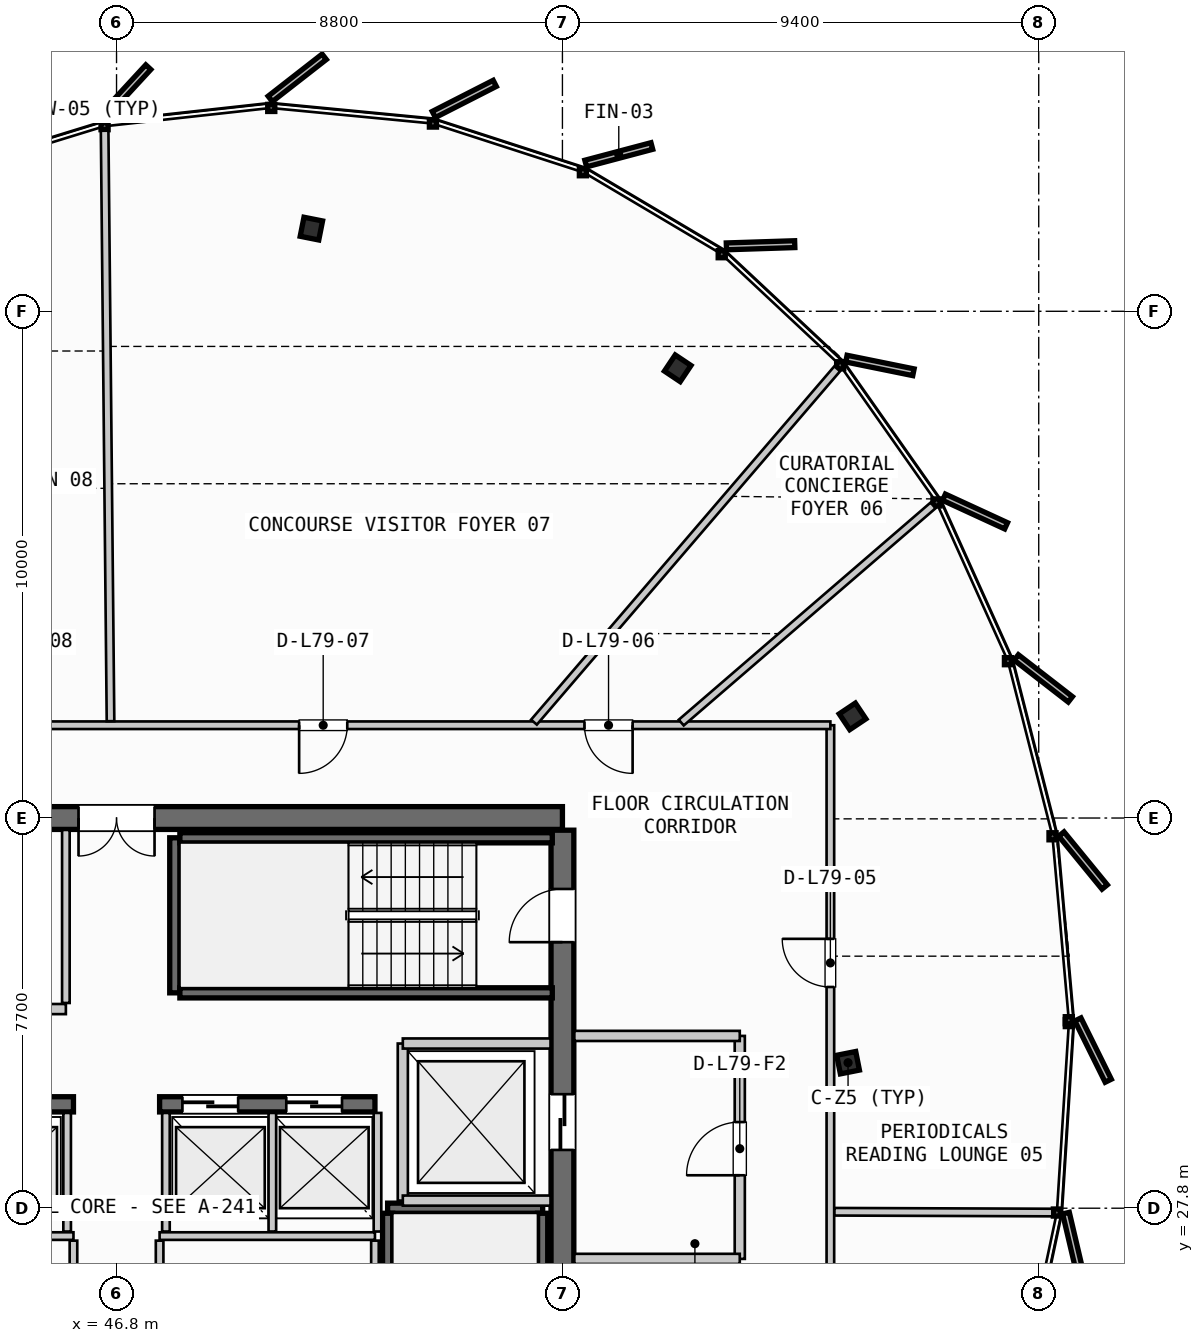
"""IFC4 building model, lengths in metres.
Left out: names, types, materials, properties, quantities, classifications, styles, units other than length and angle.
Written with IfcOpenShell. Run it as: python <this file> out.ifc"""

import sys

from ifc_helpers import new_model, si_unit, direction, frame, frame_2d, origin, origin_2d, place, context, subcontext, project, spatial, rectangle, i_section, extrude, source, transform, mapped, element, fill, save


model = new_model("IFC4")
c1 = context("Model", 3, precision=1e-05, world=origin(), true_north=direction((0.0, 1.0)))
c2 = subcontext(c1, "Body", "Model", "MODEL_VIEW")
j1 = project(units=[si_unit("LENGTHUNIT", "METRE"), si_unit("PLANEANGLEUNIT", "RADIAN")], contexts=[c1])
p1 = place(None, origin())
s1 = spatial("IfcSite", under=j1, at=p1, CompositionType="ELEMENT")
p2 = place(p1, origin())
s2 = spatial("IfcBuilding", under=s1, at=p2, CompositionType="ELEMENT")
p3 = place(p2, frame((0.0, 0.0, 297.4)))
s3 = spatial("IfcBuildingStorey", under=s2, at=p3, CompositionType="ELEMENT", Elevation=297.4)
p4 = place(p3, frame((55.6, 35.5, 0.0), z_axis=(0.0, 0.0, 1.0), x_axis=(-1.0, 0.0, 0.0)))
e1 = element("IfcWall", 1, at=p4, inside=s3, PredefinedType="SHEAR", context=c2, shape_type="SweptSolid", body=[
    extrude(rectangle(XDim=17.6, YDim=0.45, at=frame_2d((8.8, 0.0))), origin(), (0.0, 0.0, 1.0), 3.21),
])
p5 = place(p4, frame((8.05, 0.0, 0.0)))
e2 = element("IfcOpeningElement", 2, at=p5, cuts=e1, PredefinedType="OPENING", context=c2, shape_type="SweptSolid", body=[
    extrude(rectangle(XDim=1.5, YDim=2.2, at=frame_2d((0.75, 1.1))), frame((0.0, 0.235, 0.0), z_axis=(0.0, -1.0, 0.0), x_axis=(1.0, 0.0, 0.0)), (0.0, 0.0, 1.0), 0.47),
])
p6 = place(p4, frame((15.85, 0.0, 0.0)))
e3 = element("IfcOpeningElement", 3, at=p6, cuts=e1, PredefinedType="OPENING", context=c2, shape_type="SweptSolid", body=[
    extrude(rectangle(XDim=0.85, YDim=2.15, at=frame_2d((0.425, 1.075))), frame((0.0, 0.235, 0.0), z_axis=(0.0, -1.0, 0.0), x_axis=(1.0, 0.0, 0.0)), (0.0, 0.0, 1.0), 0.47),
])
p7 = place(p4, frame((14.35, 0.0, 0.0)))
e4 = element("IfcOpeningElement", 4, at=p7, cuts=e1, PredefinedType="OPENING", context=c2, shape_type="SweptSolid", body=[
    extrude(rectangle(XDim=0.85, YDim=2.15, at=frame_2d((0.425, 1.075))), frame((0.0, 0.235, 0.0), z_axis=(0.0, -1.0, 0.0), x_axis=(1.0, 0.0, 0.0)), (0.0, 0.0, 1.0), 0.47),
])
p8 = place(p4, frame((12.3, 0.0, 0.0)))
e5 = element("IfcOpeningElement", 5, at=p8, cuts=e1, PredefinedType="OPENING", context=c2, shape_type="SweptSolid", body=[
    extrude(rectangle(XDim=0.95, YDim=2.15, at=frame_2d((0.475, 1.075))), frame((0.0, 0.235, 0.0), z_axis=(0.0, -1.0, 0.0), x_axis=(1.0, 0.0, 0.0)), (0.0, 0.0, 1.0), 0.47),
])
p9 = place(p4, frame((10.2, 0.0, 0.0)))
e6 = element("IfcOpeningElement", 6, at=p9, cuts=e1, PredefinedType="OPENING", context=c2, shape_type="SweptSolid", body=[
    extrude(rectangle(XDim=0.9, YDim=2.15, at=frame_2d((0.45, 1.075))), frame((0.0, 0.235, 0.0), z_axis=(0.0, -1.0, 0.0), x_axis=(1.0, 0.0, 0.0)), (0.0, 0.0, 1.0), 0.47),
])
p10 = place(p3, frame((55.6, 20.34, 0.0), z_axis=(0.0, 0.0, 1.0), x_axis=(0.0, 1.0, 0.0)))
e7 = element("IfcWall", 7, at=p10, inside=s3, PredefinedType="SHEAR", context=c2, shape_type="SweptSolid", body=[
    extrude(rectangle(XDim=14.92, YDim=0.45, at=frame_2d((7.46, 0.0))), origin(), (0.0, 0.0, 1.0), 3.21),
])
p11 = place(p10, frame((12.71, 0.0, 0.0)))
e8 = element("IfcOpeningElement", 8, at=p11, cuts=e7, PredefinedType="OPENING", context=c2, shape_type="SweptSolid", body=[
    extrude(rectangle(XDim=1.05, YDim=2.15, at=frame_2d((0.525, 1.075))), frame((0.0, 0.235, 0.0), z_axis=(0.0, -1.0, 0.0), x_axis=(1.0, 0.0, 0.0)), (0.0, 0.0, 1.0), 0.47),
])
p12 = place(p10, frame((8.61, 0.0, 0.0)))
e9 = element("IfcOpeningElement", 9, at=p12, cuts=e7, PredefinedType="OPENING", context=c2, shape_type="SweptSolid", body=[
    extrude(rectangle(XDim=1.1, YDim=2.2, at=frame_2d((0.55, 1.1))), frame((0.0, 0.235, 0.0), z_axis=(0.0, -1.0, 0.0), x_axis=(1.0, 0.0, 0.0)), (0.0, 0.0, 1.0), 0.47),
])
p13 = place(p3, frame((41.7, 29.85, 0.0), z_axis=(0.0, 0.0, 1.0), x_axis=(1.0, 0.0, 0.0)))
e10 = element("IfcWall", 10, at=p13, inside=s3, PredefinedType="SHEAR", context=c2, shape_type="SweptSolid", body=[
    extrude(rectangle(XDim=4.25, YDim=0.3, at=frame_2d((2.125, 0.0))), origin(), (0.0, 0.0, 1.0), 3.21),
])
p14 = place(p13, frame((0.45, 0.0, 0.0)))
e11 = element("IfcOpeningElement", 11, at=p14, cuts=e10, PredefinedType="OPENING", context=c2, shape_type="SweptSolid", body=[
    extrude(rectangle(XDim=1.1, YDim=2.2, at=frame_2d((0.55, 1.1))), frame((0.0, 0.16, 0.0), z_axis=(0.0, -1.0, 0.0), x_axis=(1.0, 0.0, 0.0)), (0.0, 0.0, 1.0), 0.32),
])
p15 = place(p13, frame((2.5, 0.0, 0.0)))
e12 = element("IfcOpeningElement", 12, at=p15, cuts=e10, PredefinedType="OPENING", context=c2, shape_type="SweptSolid", body=[
    extrude(rectangle(XDim=1.1, YDim=2.2, at=frame_2d((0.55, 1.1))), frame((0.0, 0.16, 0.0), z_axis=(0.0, -1.0, 0.0), x_axis=(1.0, 0.0, 0.0)), (0.0, 0.0, 1.0), 0.32),
])
p16 = place(p3, frame((47.65, 29.85, 0.0), z_axis=(0.0, 0.0, 1.0), x_axis=(1.0, 0.0, 0.0)))
e13 = element("IfcWall", 13, at=p16, inside=s3, PredefinedType="SHEAR", context=c2, shape_type="SweptSolid", body=[
    extrude(rectangle(XDim=4.25, YDim=0.3, at=frame_2d((2.125, 0.0))), origin(), (0.0, 0.0, 1.0), 3.21),
])
p17 = place(p16, frame((0.45, 0.0, 0.0)))
e14 = element("IfcOpeningElement", 14, at=p17, cuts=e13, PredefinedType="OPENING", context=c2, shape_type="SweptSolid", body=[
    extrude(rectangle(XDim=1.1, YDim=2.2, at=frame_2d((0.55, 1.1))), frame((0.0, 0.16, 0.0), z_axis=(0.0, -1.0, 0.0), x_axis=(1.0, 0.0, 0.0)), (0.0, 0.0, 1.0), 0.32),
])
p18 = place(p16, frame((2.5, 0.0, 0.0)))
e15 = element("IfcOpeningElement", 15, at=p18, cuts=e13, PredefinedType="OPENING", context=c2, shape_type="SweptSolid", body=[
    extrude(rectangle(XDim=1.1, YDim=2.2, at=frame_2d((0.55, 1.1))), frame((0.0, 0.16, 0.0), z_axis=(0.0, -1.0, 0.0), x_axis=(1.0, 0.0, 0.0)), (0.0, 0.0, 1.0), 0.32),
])
m1 = source(origin(), c2, "Body", "SweptSolid", [
    extrude(i_section(OverallWidth=0.374, OverallDepth=0.383, WebThickness=0.017, FlangeThickness=0.026, FilletRadius=0.015, at=origin_2d()), origin(), (0.0, 0.0, 1.0), 3.21),
])
for number, where, z_axis, x_axis in (
    (16, (61.237, 30.672, 0.0), (0.0, 0.0, 1.0), (0.981, 0.195, 0.0)),
    (17, (61.326, 37.506, 0.0), (0.0, 0.0, 1.0), (0.831, 0.556, 0.0)),
    (18, (57.875, 44.375, 0.0), (0.0, 0.0, 1.0), (0.556, 0.831, 0.0)),
    (19, (50.645, 47.132, 0.0), (0.0, 0.0, 1.0), (0.195, 0.981, 0.0)),
):
    element("IfcColumn", number, at=place(p3, frame(where, z_axis=z_axis, x_axis=x_axis)), inside=s3, PredefinedType="COLUMN", context=c2, shape_type="MappedRepresentation", body=[
        mapped(m1, transform((0.0, 0.0, 0.0), scale=1.0)),
    ])
p19 = place(p3, frame((52.15, 27.8, 0.0), z_axis=(0.0, 0.0, 1.0), x_axis=(1.0, 0.0, 0.0)))
e20 = element("IfcWall", 20, at=p19, inside=s3, PredefinedType="SHEAR", context=c2, shape_type="SweptSolid", body=[
    extrude(rectangle(XDim=3.06, YDim=0.2, at=frame_2d((1.53, 0.0))), origin(), (0.0, 0.0, 1.0), 3.21),
])
for number, where, z_axis, x_axis in (
    (21, (55.21, 27.7, 0.0), (0.0, 0.0, 1.0), (0.0, -1.0, 0.0)),
    (22, (52.15, 20.35, 0.0), (0.0, 0.0, 1.0), (0.0, 1.0, 0.0)),
):
    element("IfcWall", number, at=place(p3, frame(where, z_axis=z_axis, x_axis=x_axis)), inside=s3, PredefinedType="SHEAR", context=c2, shape_type="SweptSolid", body=[
        extrude(rectangle(XDim=7.35, YDim=0.2, at=frame_2d((3.675, 0.0))), origin(), (0.0, 0.0, 1.0), 3.21),
    ])
p20 = place(p3, frame((47.95, 32.05, 0.0), z_axis=(0.0, 0.0, 1.0), x_axis=(0.0, 1.0, 0.0)))
e23 = element("IfcWall", 23, at=p20, inside=s3, PredefinedType="SHEAR", context=c2, shape_type="SweptSolid", body=[
    extrude(rectangle(XDim=3.06, YDim=0.2, at=frame_2d((1.53, 0.0))), origin(), (0.0, 0.0, 1.0), 3.21),
])
for number, where, z_axis, x_axis in (
    (24, (48.05, 35.11, 0.0), (0.0, 0.0, 1.0), (1.0, 0.0, 0.0)),
    (25, (55.4, 32.05, 0.0), (0.0, 0.0, 1.0), (-1.0, 0.0, 0.0)),
):
    element("IfcWall", number, at=place(p3, frame(where, z_axis=z_axis, x_axis=x_axis)), inside=s3, PredefinedType="SHEAR", context=c2, shape_type="SweptSolid", body=[
        extrude(rectangle(XDim=7.35, YDim=0.2, at=frame_2d((3.675, 0.0))), origin(), (0.0, 0.0, 1.0), 3.21),
    ])
p21 = place(p3, frame((52.45, 27.95, 0.0), z_axis=(0.0, 0.0, 1.0), x_axis=(0.0, 1.0, 0.0)))
e26 = element("IfcWall", 26, at=p21, inside=s3, PredefinedType="PARTITIONING", context=c2, shape_type="SweptSolid", body=[
    extrude(rectangle(XDim=3.1, YDim=0.2, at=frame_2d((1.55, 0.0))), origin(), (0.0, 0.0, 1.0), 2.28),
])
for number, where, z_axis, x_axis in (
    (27, (52.45, 27.95, 0.0), (0.0, 0.0, 1.0), (1.0, 0.0, 0.0)),
    (28, (52.45, 31.05, 0.0), (0.0, 0.0, 1.0), (1.0, 0.0, 0.0)),
):
    element("IfcWall", number, at=place(p3, frame(where, z_axis=z_axis, x_axis=x_axis)), inside=s3, PredefinedType="PARTITIONING", context=c2, shape_type="SweptSolid", body=[
        extrude(rectangle(XDim=2.915, YDim=0.2, at=frame_2d((1.458, 0.0))), origin(), (0.0, 0.0, 1.0), 2.28),
    ])
p22 = place(p3, frame((59.1, 26.8, 0.0), z_axis=(0.0, 0.0, 1.0), x_axis=(0.0, 1.0, 0.0)))
e29 = element("IfcWall", 29, at=p22, inside=s3, PredefinedType="PARTITIONING", context=c2, shape_type="SweptSolid", body=[
    extrude(rectangle(XDim=4.4, YDim=0.2, at=frame_2d((2.2, 0.0))), origin(), (0.0, 0.0, 1.0), 2.28),
])
p23 = place(p22, frame((1.65, 0.0, 0.0)))
e30 = element("IfcOpeningElement", 30, at=p23, cuts=e29, PredefinedType="OPENING", context=c2, shape_type="SweptSolid", body=[
    extrude(rectangle(XDim=1.05, YDim=2.15, at=frame_2d((0.525, 1.075))), frame((0.0, 0.11, 0.0), z_axis=(0.0, -1.0, 0.0), x_axis=(1.0, 0.0, 0.0)), (0.0, 0.0, 1.0), 0.22),
])
for number, where, z_axis, x_axis in (
    (31, (55.835, 26.8, 0.0), (0.0, 0.0, 1.0), (1.0, 0.0, 0.0)),
    (32, (55.835, 31.2, 0.0), (0.0, 0.0, 1.0), (1.0, 0.0, 0.0)),
):
    element("IfcWall", number, at=place(p3, frame(where, z_axis=z_axis, x_axis=x_axis)), inside=s3, PredefinedType="PARTITIONING", context=c2, shape_type="SweptSolid", body=[
        extrude(rectangle(XDim=3.265, YDim=0.2, at=frame_2d((1.633, 0.0))), origin(), (0.0, 0.0, 1.0), 2.28),
    ])
for number, where, z_axis, x_axis in (
    (33, (41.7, 27.25, 0.0), (0.0, 0.0, 1.0), (1.0, 0.0, 0.0)),
    (34, (47.65, 27.25, 0.0), (0.0, 0.0, 1.0), (1.0, 0.0, 0.0)),
):
    element("IfcWall", number, at=place(p3, frame(where, z_axis=z_axis, x_axis=x_axis)), inside=s3, PredefinedType="PARTITIONING", context=c2, shape_type="SweptSolid", body=[
        extrude(rectangle(XDim=4.25, YDim=0.15, at=frame_2d((2.125, 0.0))), origin(), (0.0, 0.0, 1.0), 2.28),
    ])
for number, where, z_axis, x_axis in (
    (35, (45.95, 24.92, 0.0), (0.0, 0.0, 1.0), (0.0, 1.0, 0.0)),
    (36, (47.65, 24.92, 0.0), (0.0, 0.0, 1.0), (0.0, 1.0, 0.0)),
    (37, (51.9, 24.92, 0.0), (0.0, 0.0, 1.0), (0.0, 1.0, 0.0)),
):
    element("IfcWall", number, at=place(p3, frame(where, z_axis=z_axis, x_axis=x_axis)), inside=s3, PredefinedType="PARTITIONING", context=c2, shape_type="SweptSolid", body=[
        extrude(rectangle(XDim=2.24, YDim=0.15, at=frame_2d((1.12, 0.0))), origin(), (0.0, 0.0, 1.0), 2.28),
    ])
for number, where, z_axis, x_axis in (
    (38, (45.825, 27.34, 0.0), (0.0, 0.0, 1.0), (0.0, 1.0, 0.0)),
    (39, (47.775, 27.34, 0.0), (0.0, 0.0, 1.0), (0.0, 1.0, 0.0)),
    (40, (49.875, 27.34, 0.0), (0.0, 0.0, 1.0), (0.0, 1.0, 0.0)),
    (41, (51.95, 27.34, 0.0), (0.0, 0.0, 1.0), (0.0, 1.0, 0.0)),
):
    element("IfcWall", number, at=place(p3, frame(where, z_axis=z_axis, x_axis=x_axis)), inside=s3, PredefinedType="PARTITIONING", context=c2, shape_type="SweptSolid", body=[
        extrude(rectangle(XDim=2.34, YDim=0.15, at=frame_2d((1.17, 0.0))), origin(), (0.0, 0.0, 1.0), 2.28),
    ])
p24 = place(p3, frame((38.235, 31.73, 0.0), z_axis=(0.0, 0.0, 1.0), x_axis=(1.0, 0.0, 0.0)))
e42 = element("IfcWall", 42, at=p24, inside=s3, PredefinedType="PARTITIONING", context=c2, shape_type="SweptSolid", body=[
    extrude(rectangle(XDim=7.565, YDim=0.2, at=frame_2d((3.782, 0.0))), origin(), (0.0, 0.0, 1.0), 2.28),
])
p25 = place(p3, frame((45.8, 31.85, 0.0), z_axis=(0.0, 0.0, 1.0), x_axis=(0.0, 1.0, 0.0)))
e43 = element("IfcWall", 43, at=p25, inside=s3, PredefinedType="PARTITIONING", context=c2, shape_type="SweptSolid", body=[
    extrude(rectangle(XDim=3.415, YDim=0.15, at=frame_2d((1.708, 0.0))), origin(), (0.0, 0.0, 1.0), 2.28),
])
p26 = place(p3, frame((60.888, 17.807, 0.0), z_axis=(0.0, 0.0, 1.0), x_axis=(0.0, 1.0, 0.0)))
e44 = element("IfcWall", 44, at=p26, inside=s3, PredefinedType="PARTITIONING", context=c2, shape_type="SweptSolid", body=[
    extrude(rectangle(XDim=19.524, YDim=0.15, at=frame_2d((9.762, 0.0))), origin(), (0.0, 0.0, 1.0), 2.28),
])
p27 = place(p26, frame((5.089, 0.0, 0.0)))
e45 = element("IfcOpeningElement", 45, at=p27, cuts=e44, PredefinedType="OPENING", context=c2, shape_type="SweptSolid", body=[
    extrude(rectangle(XDim=0.95, YDim=2.15, at=frame_2d((0.475, 1.075))), frame((0.0, 0.085, 0.0), z_axis=(0.0, -1.0, 0.0), x_axis=(1.0, 0.0, 0.0)), (0.0, 0.0, 1.0), 0.17),
])
p28 = place(p26, frame((14.359, 0.0, 0.0)))
e46 = element("IfcOpeningElement", 46, at=p28, cuts=e44, PredefinedType="OPENING", context=c2, shape_type="SweptSolid", body=[
    extrude(rectangle(XDim=0.95, YDim=2.15, at=frame_2d((0.475, 1.075))), frame((0.0, 0.085, 0.0), z_axis=(0.0, -1.0, 0.0), x_axis=(1.0, 0.0, 0.0)), (0.0, 0.0, 1.0), 0.17),
])
p29 = place(p3, frame((60.888, 37.331, 0.0), z_axis=(0.0, 0.0, 1.0), x_axis=(-1.0, 0.0, 0.0)))
e47 = element("IfcWall", 47, at=p29, inside=s3, PredefinedType="PARTITIONING", context=c2, shape_type="SweptSolid", body=[
    extrude(rectangle(XDim=28.038, YDim=0.15, at=frame_2d((14.019, 0.0))), origin(), (0.0, 0.0, 1.0), 2.28),
])
p30 = place(p29, frame((3.903, 0.0, 0.0)))
e48 = element("IfcOpeningElement", 48, at=p30, cuts=e47, PredefinedType="OPENING", context=c2, shape_type="SweptSolid", body=[
    extrude(rectangle(XDim=0.95, YDim=2.15, at=frame_2d((0.475, 1.075))), frame((0.0, 0.085, 0.0), z_axis=(0.0, -1.0, 0.0), x_axis=(1.0, 0.0, 0.0)), (0.0, 0.0, 1.0), 0.17),
])
p31 = place(p29, frame((9.534, 0.0, 0.0)))
e49 = element("IfcOpeningElement", 49, at=p31, cuts=e47, PredefinedType="OPENING", context=c2, shape_type="SweptSolid", body=[
    extrude(rectangle(XDim=0.95, YDim=2.15, at=frame_2d((0.475, 1.075))), frame((0.0, 0.085, 0.0), z_axis=(0.0, -1.0, 0.0), x_axis=(1.0, 0.0, 0.0)), (0.0, 0.0, 1.0), 0.17),
])
p32 = place(p29, frame((15.393, 0.0, 0.0)))
e50 = element("IfcOpeningElement", 50, at=p32, cuts=e47, PredefinedType="OPENING", context=c2, shape_type="SweptSolid", body=[
    extrude(rectangle(XDim=0.95, YDim=2.15, at=frame_2d((0.475, 1.075))), frame((0.0, 0.085, 0.0), z_axis=(0.0, -1.0, 0.0), x_axis=(1.0, 0.0, 0.0)), (0.0, 0.0, 1.0), 0.17),
])
p33 = place(p29, frame((22.011, 0.0, 0.0)))
e51 = element("IfcOpeningElement", 51, at=p33, cuts=e47, PredefinedType="OPENING", context=c2, shape_type="SweptSolid", body=[
    extrude(rectangle(XDim=0.95, YDim=2.15, at=frame_2d((0.475, 1.075))), frame((0.0, 0.085, 0.0), z_axis=(0.0, -1.0, 0.0), x_axis=(1.0, 0.0, 0.0)), (0.0, 0.0, 1.0), 0.17),
])
p34 = place(p3, frame((60.968, 27.73, 0.0), z_axis=(0.0, 0.0, 1.0), x_axis=(0.999993399001, -0.003633449389, 0.0)))
e52 = element("IfcWall", 52, at=p34, inside=s3, PredefinedType="PARTITIONING", context=c2, shape_type="SweptSolid", body=[
    extrude(rectangle(XDim=4.3, YDim=0.15, at=frame_2d((2.15, 0.0))), origin(), (0.0, 0.0, 1.0), 2.28),
])
p35 = place(p3, frame((57.945, 37.383, 0.0), z_axis=(0.0, 0.0, 1.0), x_axis=(0.757304636247, 0.653061779558, 0.0)))
e53 = element("IfcWall", 53, at=p35, inside=s3, PredefinedType="PARTITIONING", context=c2, shape_type="SweptSolid", body=[
    extrude(rectangle(XDim=6.562, YDim=0.15, at=frame_2d((3.281, 0.0))), origin(), (0.0, 0.0, 1.0), 2.28),
])
p36 = place(p3, frame((55.038, 37.392, 0.0), z_axis=(0.0, 0.0, 1.0), x_axis=(0.651204764104, 0.758902072213, 0.0)))
e54 = element("IfcWall", 54, at=p36, inside=s3, PredefinedType="PARTITIONING", context=c2, shape_type="SweptSolid", body=[
    extrude(rectangle(XDim=9.19, YDim=0.15, at=frame_2d((4.595, 0.0))), origin(), (0.0, 0.0, 1.0), 2.28),
])
p37 = place(p3, frame((46.681, 37.411, 0.0), z_axis=(0.0, 0.0, 1.0), x_axis=(-0.00999384371, 0.999950060297, 0.0)))
e55 = element("IfcWall", 55, at=p37, inside=s3, PredefinedType="PARTITIONING", context=c2, shape_type="SweptSolid", body=[
    extrude(rectangle(XDim=11.653, YDim=0.15, at=frame_2d((5.826, 0.0))), origin(), (0.0, 0.0, 1.0), 2.28),
])
m2 = source(origin(), c2, "Body", "SweptSolid", [
    extrude(rectangle(XDim=1.05, YDim=2.15, at=frame_2d((0.525, 1.075))), frame((0.0, 0.025, 0.0), z_axis=(0.0, -1.0, 0.0), x_axis=(1.0, 0.0, 0.0)), (0.0, 0.0, 1.0), 0.05),
])
p38 = place(p11, origin())
e56 = element("IfcDoor", 56, at=p38, inside=s3, OperationType="SINGLE_SWING_LEFT", PredefinedType="DOOR", context=c2, shape_type="MappedRepresentation", body=[
    mapped(m2, transform((0.0, 0.0, 0.0), scale=1.0)),
])
fill(e8, e56)
m3 = source(origin(), c2, "Body", "SweptSolid", [
    extrude(rectangle(XDim=1.5, YDim=2.2, at=frame_2d((0.75, 1.1))), frame((0.0, 0.025, 0.0), z_axis=(0.0, -1.0, 0.0), x_axis=(1.0, 0.0, 0.0)), (0.0, 0.0, 1.0), 0.05),
])
p39 = place(p5, origin())
e57 = element("IfcDoor", 57, at=p39, inside=s3, OperationType="DOUBLE_DOOR_SINGLE_SWING", PredefinedType="DOOR", context=c2, shape_type="MappedRepresentation", body=[
    mapped(m3, transform((0.0, 0.0, 0.0), scale=1.0)),
])
fill(e2, e57)
m4 = source(origin(), c2, "Body", "SweptSolid", [
    extrude(rectangle(XDim=1.1, YDim=2.2, at=frame_2d((0.55, 1.1))), frame((0.0, 0.025, 0.0), z_axis=(0.0, -1.0, 0.0), x_axis=(1.0, 0.0, 0.0)), (0.0, 0.0, 1.0), 0.05),
])
p40 = place(p12, origin())
e58 = element("IfcDoor", 58, at=p40, inside=s3, OperationType="SLIDING_TO_RIGHT", PredefinedType="DOOR", context=c2, shape_type="MappedRepresentation", body=[
    mapped(m4, transform((0.0, 0.0, 0.0), scale=1.0)),
])
fill(e9, e58)
p41 = place(p17, origin())
e59 = element("IfcDoor", 59, at=p41, inside=s3, OperationType="SLIDING_TO_LEFT", PredefinedType="DOOR", context=c2, shape_type="MappedRepresentation", body=[
    mapped(m4, transform((0.0, 0.0, 0.0), scale=1.0)),
])
fill(e14, e59)
p42 = place(p18, origin())
e60 = element("IfcDoor", 60, at=p42, inside=s3, OperationType="SLIDING_TO_LEFT", PredefinedType="DOOR", context=c2, shape_type="MappedRepresentation", body=[
    mapped(m4, transform((0.0, 0.0, 0.0), scale=1.0)),
])
fill(e15, e60)
p43 = place(p23, origin())
e61 = element("IfcDoor", 61, at=p43, inside=s3, OperationType="SINGLE_SWING_LEFT", PredefinedType="DOOR", context=c2, shape_type="MappedRepresentation", body=[
    mapped(m2, transform((0.0, 0.0, 0.0), scale=1.0)),
])
fill(e30, e61)
m5 = source(origin(), c2, "Body", "SweptSolid", [
    extrude(rectangle(XDim=0.95, YDim=2.15, at=frame_2d((0.475, 1.075))), frame((0.0, 0.025, 0.0), z_axis=(0.0, -1.0, 0.0), x_axis=(1.0, 0.0, 0.0)), (0.0, 0.0, 1.0), 0.05),
])
p44 = place(p28, origin())
e62 = element("IfcDoor", 62, at=p44, inside=s3, OperationType="SINGLE_SWING_RIGHT", PredefinedType="DOOR", context=c2, shape_type="MappedRepresentation", body=[
    mapped(m5, transform((0.0, 0.0, 0.0), scale=1.0)),
])
fill(e46, e62)
p45 = place(p30, origin())
e63 = element("IfcDoor", 63, at=p45, inside=s3, OperationType="SINGLE_SWING_LEFT", PredefinedType="DOOR", context=c2, shape_type="MappedRepresentation", body=[
    mapped(m5, transform((0.0, 0.0, 0.0), scale=1.0)),
])
fill(e48, e63)
p46 = place(p31, origin())
e64 = element("IfcDoor", 64, at=p46, inside=s3, OperationType="SINGLE_SWING_RIGHT", PredefinedType="DOOR", context=c2, shape_type="MappedRepresentation", body=[
    mapped(m5, transform((0.0, 0.0, 0.0), scale=1.0)),
])
fill(e49, e64)
save(model, sys.argv[1])
